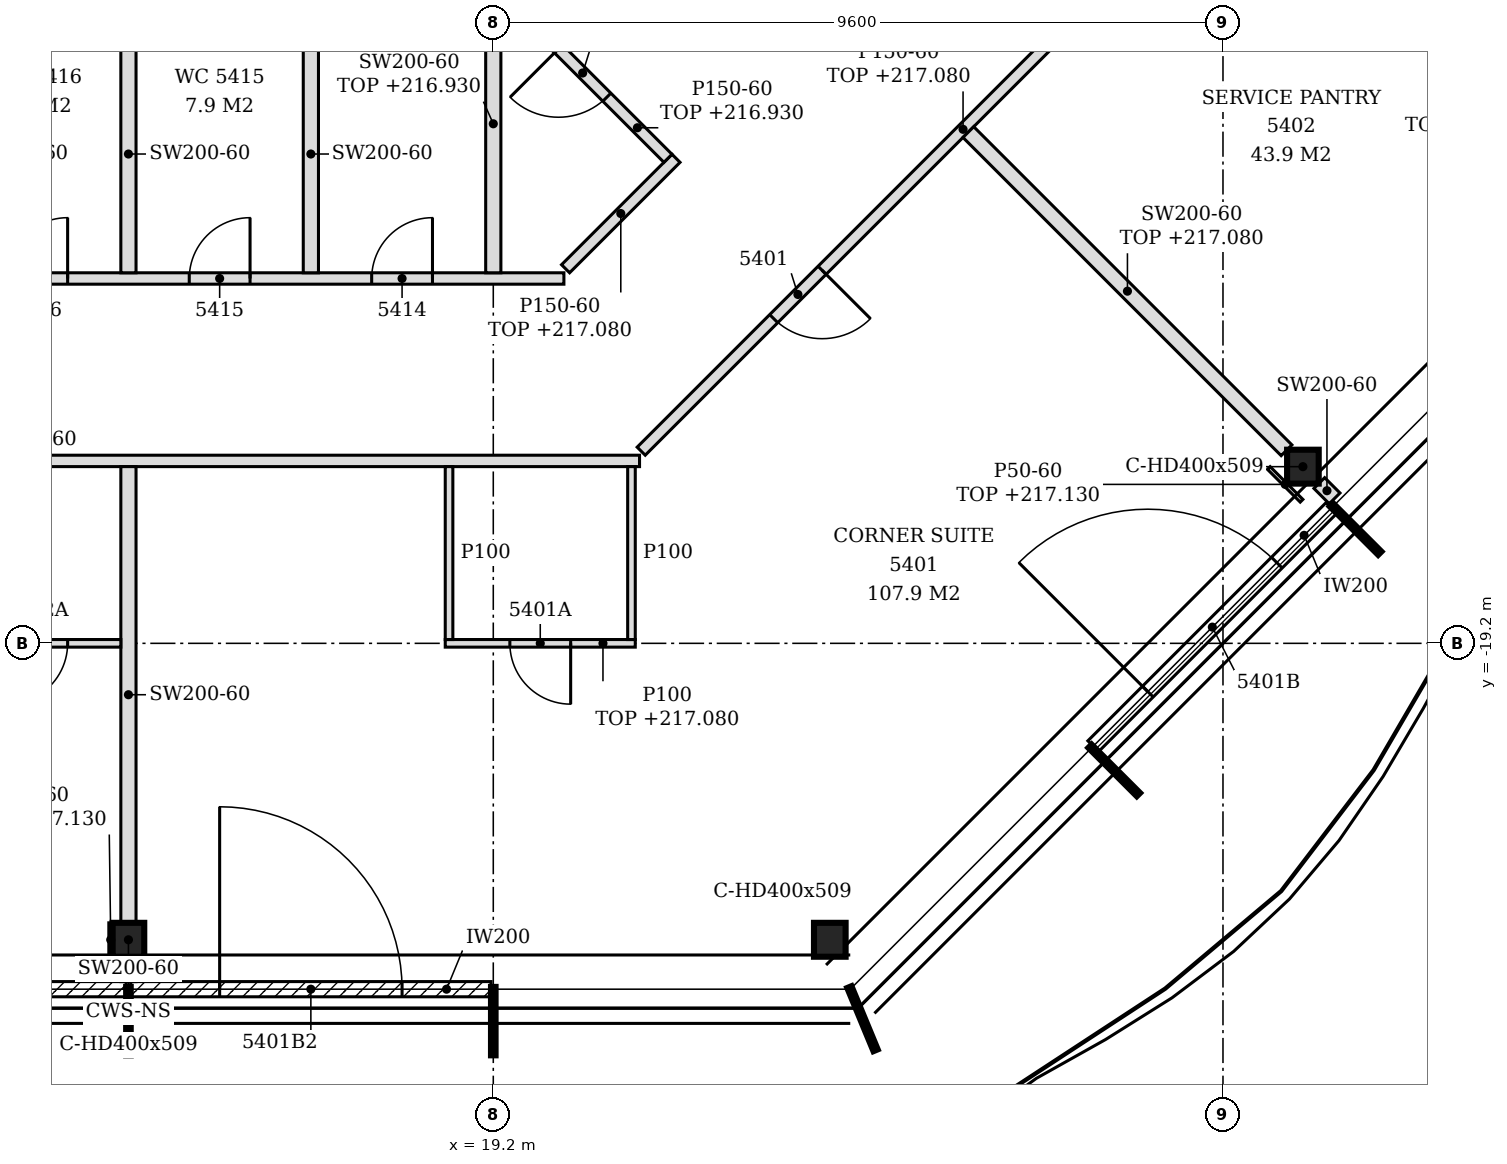
"""IFC4 building model, lengths in metres.
Left out: names, types, materials, properties, quantities, classifications, styles, units other than length and angle.
Written with IfcOpenShell. Run it as: python <this file> out.ifc"""

import sys

from ifc_helpers import new_model, si_unit, direction, frame, frame_2d, origin, origin_2d, place, context, subcontext, project, spatial, polyline, rectangle, i_section, outline, extrude, element, fill, save


model = new_model("IFC4")
c1 = context("Model", 3, precision=1e-05, world=origin(), true_north=direction((0.0, 1.0)))
c2 = subcontext(c1, "Body", "Model", "MODEL_VIEW")
j1 = project(units=[si_unit("LENGTHUNIT", "METRE"), si_unit("PLANEANGLEUNIT", "RADIAN")], contexts=[c1])
p1 = place(None, origin())
s1 = spatial("IfcSite", under=j1, at=p1, CompositionType="ELEMENT")
p2 = place(p1, origin())
s2 = spatial("IfcBuilding", under=s1, at=p2, CompositionType="ELEMENT")
p3 = place(p2, frame((0.0, 0.0, 214.2)))
s3 = spatial("IfcBuildingStorey", under=s2, at=p3, CompositionType="ELEMENT", Elevation=214.2)
for number, where, z_axis, x_axis in (
    (1, (14.4, -23.1, -0.15), (0.0, 0.0, 1.0), (1.0, 0.0, 0.0)),
    (2, (23.627, -23.1, -0.15), (0.0, 0.0, 1.0), (1.0, 0.0, 0.0)),
    (3, (29.852, -16.876, -0.15), (0.0, 0.0, 1.0), (1.0, 0.0, 0.0)),
):
    element("IfcColumn", number, at=place(p3, frame(where, z_axis=z_axis, x_axis=x_axis)), inside=s3, PredefinedType="COLUMN", context=c2, shape_type="SweptSolid", body=[
        extrude(i_section(OverallWidth=0.416, OverallDepth=0.446, WebThickness=0.039, FlangeThickness=0.063, FilletRadius=0.015, at=origin_2d()), origin(), (0.0, 0.0, 1.0), 3.6),
    ])
p4 = place(p3, frame((9.63, -23.75, 0.0), z_axis=(0.0, 0.0, 1.0), x_axis=(1.0, 0.0, 0.0)))
e4 = element("IfcWall", 4, at=p4, inside=s3, PredefinedType="NOTDEFINED", context=c2, shape_type="SweptSolid", body=[
    extrude(rectangle(XDim=4.74, YDim=0.2, at=frame_2d((2.37, 0.0))), origin(), (0.0, 0.0, 1.0), 3.45),
])
p5 = place(p4, frame((1.17, 0.0, 0.0)))
e5 = element("IfcOpeningElement", 5, at=p5, cuts=e4, PredefinedType="OPENING", context=c2, shape_type="SweptSolid", body=[
    extrude(rectangle(XDim=2.4, YDim=2.4, at=frame_2d((1.2, 1.2))), frame((0.0, 0.11, 0.0), z_axis=(0.0, -1.0, 0.0), x_axis=(1.0, 0.0, 0.0)), (0.0, 0.0, 1.0), 0.22),
])
p6 = place(p3, frame((14.43, -23.75, 0.0), z_axis=(0.0, 0.0, 1.0), x_axis=(1.0, 0.0, 0.0)))
e6 = element("IfcWall", 6, at=p6, inside=s3, PredefinedType="NOTDEFINED", context=c2, shape_type="SweptSolid", body=[
    extrude(rectangle(XDim=4.74, YDim=0.2, at=frame_2d((2.37, 0.0))), origin(), (0.0, 0.0, 1.0), 3.45),
])
p7 = place(p6, frame((1.17, 0.0, 0.0)))
e7 = element("IfcOpeningElement", 7, at=p7, cuts=e6, PredefinedType="OPENING", context=c2, shape_type="SweptSolid", body=[
    extrude(rectangle(XDim=2.4, YDim=2.4, at=frame_2d((1.2, 1.2))), frame((0.0, 0.11, 0.0), z_axis=(0.0, -1.0, 0.0), x_axis=(1.0, 0.0, 0.0)), (0.0, 0.0, 1.0), 0.22),
])
p8 = place(p3, frame((27.093, -20.553, 0.0), z_axis=(0.0, 0.0, 1.0), x_axis=(0.707079231393, 0.707134329907, 0.0)))
e8 = element("IfcWall", 8, at=p8, inside=s3, PredefinedType="NOTDEFINED", context=c2, shape_type="SweptSolid", body=[
    extrude(rectangle(XDim=4.431, YDim=0.2, at=frame_2d((2.215, 0.0))), origin(), (0.0, 0.0, 1.0), 3.45),
])
p9 = place(p8, frame((1.015, 0.0, 0.0)))
e9 = element("IfcOpeningElement", 9, at=p9, cuts=e8, PredefinedType="OPENING", context=c2, shape_type="SweptSolid", body=[
    extrude(rectangle(XDim=2.4, YDim=2.4, at=frame_2d((1.2, 1.2))), frame((0.0, 0.11, 0.0), z_axis=(0.0, -1.0, 0.0), x_axis=(1.0, 0.0, 0.0)), (0.0, 0.0, 1.0), 0.22),
])
p10 = place(p3, frame((14.4, -23.65, 0.0), z_axis=(0.0, 0.0, 1.0), x_axis=(0.0, 1.0, 0.0)))
e10 = element("IfcWall", 10, at=p10, inside=s3, PredefinedType="PARTITIONING", context=c2, shape_type="SweptSolid", body=[
    extrude(rectangle(XDim=0.327, YDim=0.2, at=frame_2d((0.164, 0.0))), origin(), (0.0, 0.0, 1.0), 3.45),
])
p11 = place(p3, frame((14.4, -22.877, 0.0), z_axis=(0.0, 0.0, 1.0), x_axis=(0.0, 1.0, 0.0)))
e11 = element("IfcWall", 11, at=p11, inside=s3, PredefinedType="PARTITIONING", context=c2, shape_type="SweptSolid", body=[
    extrude(outline(polyline([(0.0, 0.0), (6.002, 0.0), (6.002, 3.45), (3.782, 3.45), (3.78, 2.88), (3.572, 2.88), (3.57, 3.45), (0.0, 3.45), (0.0, 0.0)])), frame((0.0, 0.1, 0.0), z_axis=(0.0, -1.0, 0.0), x_axis=(1.0, 0.0, 0.0)), (0.0, 0.0, 1.0), 0.2),
])
p12 = place(p3, frame((11.95, -19.2, 0.0), z_axis=(0.0, 0.0, 1.0), x_axis=(1.0, 0.0, 0.0)))
e12 = element("IfcWall", 12, at=p12, inside=s3, PredefinedType="PARTITIONING", context=c2, shape_type="SweptSolid", body=[
    extrude(rectangle(XDim=2.35, YDim=0.1, at=frame_2d((1.175, 0.0))), origin(), (0.0, 0.0, 1.0), 2.88),
])
p13 = place(p12, frame((0.85, 0.0, 0.0)))
e13 = element("IfcOpeningElement", 13, at=p13, cuts=e12, PredefinedType="OPENING", context=c2, shape_type="SweptSolid", body=[
    extrude(rectangle(XDim=0.8, YDim=2.1, at=frame_2d((0.4, 1.05))), frame((0.0, 0.06, 0.0), z_axis=(0.0, -1.0, 0.0), x_axis=(1.0, 0.0, 0.0)), (0.0, 0.0, 1.0), 0.12),
])
p14 = place(p3, frame((18.568, -19.2, 0.0), z_axis=(0.0, 0.0, 1.0), x_axis=(1.0, 0.0, 0.0)))
e14 = element("IfcWall", 14, at=p14, inside=s3, PredefinedType="PARTITIONING", context=c2, shape_type="SweptSolid", body=[
    extrude(outline(polyline([(0.0, 0.0), (2.5, 0.0), (2.5, 2.88), (0.782, 2.88), (0.78, 2.73), (0.482, 2.73), (0.48, 2.88), (0.0, 2.88), (0.0, 0.0)])), frame((0.0, 0.05, 0.0), z_axis=(0.0, -1.0, 0.0), x_axis=(1.0, 0.0, 0.0)), (0.0, 0.0, 1.0), 0.1),
])
p15 = place(p14, frame((0.85, 0.0, 0.0)))
e15 = element("IfcOpeningElement", 15, at=p15, cuts=e14, PredefinedType="OPENING", context=c2, shape_type="SweptSolid", body=[
    extrude(rectangle(XDim=0.8, YDim=2.1, at=frame_2d((0.4, 1.05))), frame((0.0, 0.06, 0.0), z_axis=(0.0, -1.0, 0.0), x_axis=(1.0, 0.0, 0.0)), (0.0, 0.0, 1.0), 0.12),
])
p16 = place(p3, frame((18.618, -19.15, 0.0), z_axis=(0.0, 0.0, 1.0), x_axis=(0.0, 1.0, 0.0)))
e16 = element("IfcWall", 16, at=p16, inside=s3, PredefinedType="PARTITIONING", context=c2, shape_type="SweptSolid", body=[
    extrude(outline(polyline([(0.0, 0.0), (2.275, 0.0), (2.275, 3.45), (0.055, 3.45), (0.053, 2.88), (0.0, 2.88), (0.0, 0.0)])), frame((0.0, 0.05, 0.0), z_axis=(0.0, -1.0, 0.0), x_axis=(1.0, 0.0, 0.0)), (0.0, 0.0, 1.0), 0.1),
])
p17 = place(p3, frame((21.018, -19.15, 0.0), z_axis=(0.0, 0.0, 1.0), x_axis=(0.0, 1.0, 0.0)))
e17 = element("IfcWall", 17, at=p17, inside=s3, PredefinedType="PARTITIONING", context=c2, shape_type="SweptSolid", body=[
    extrude(outline(polyline([(0.0, 0.0), (2.275, 0.0), (2.275, 3.45), (0.045, 3.45), (0.043, 2.98), (0.0, 2.98), (0.0, 0.0)])), frame((0.0, 0.05, 0.0), z_axis=(0.0, -1.0, 0.0), x_axis=(1.0, 0.0, 0.0)), (0.0, 0.0, 1.0), 0.1),
])
p18 = place(p3, frame((30.269, -17.293, 0.0), z_axis=(0.0, 0.0, 1.0), x_axis=(-0.707106781187, 0.707106781187, 0.0)))
e18 = element("IfcWall", 18, at=p18, inside=s3, PredefinedType="PARTITIONING", context=c2, shape_type="SweptSolid", body=[
    extrude(rectangle(XDim=0.285, YDim=0.2, at=frame_2d((0.143, 0.0))), origin(), (0.0, 0.0, 1.0), 3.45),
])
p19 = place(p3, frame((-0.844, -16.8, 0.0), z_axis=(0.0, 0.0, 1.0), x_axis=(1.0, 0.0, 0.0)))
e19 = element("IfcWall", 19, at=p19, inside=s3, PredefinedType="PARTITIONING", context=c2, shape_type="SweptSolid", body=[
    extrude(outline(polyline([(0.0, 0.0), (21.968, 0.0), (21.968, 3.45), (20.194, 3.45), (20.191, 2.73), (19.894, 2.73), (19.892, 3.45), (8.194, 3.45), (8.191, 2.73), (7.894, 2.73), (7.892, 3.45), (0.0, 3.45), (0.0, 0.0)])), frame((0.0, 0.075, 0.0), z_axis=(0.0, -1.0, 0.0), x_axis=(1.0, 0.0, 0.0)), (0.0, 0.0, 1.0), 0.15),
])
p20 = place(p19, frame((5.194, 0.0, 0.0)))
e20 = element("IfcOpeningElement", 20, at=p20, cuts=e19, PredefinedType="OPENING", context=c2, shape_type="SweptSolid", body=[
    extrude(rectangle(XDim=0.9, YDim=2.1, at=frame_2d((0.45, 1.05))), frame((0.0, 0.085, 0.0), z_axis=(0.0, -1.0, 0.0), x_axis=(1.0, 0.0, 0.0)), (0.0, 0.0, 1.0), 0.17),
])
p21 = place(p3, frame((21.146, -16.672, 0.0), z_axis=(0.0, 0.0, 1.0), x_axis=(0.707100999376, 0.70711256295, 0.0)))
e21 = element("IfcWall", 21, at=p21, inside=s3, PredefinedType="PARTITIONING", context=c2, shape_type="SweptSolid", body=[
    extrude(rectangle(XDim=21.113, YDim=0.15, at=frame_2d((10.556, 0.0))), origin(), (0.0, 0.0, 1.0), 2.88),
])
p22 = place(p21, frame((2.466, 0.0, 0.0)))
e22 = element("IfcOpeningElement", 22, at=p22, cuts=e21, PredefinedType="OPENING", context=c2, shape_type="SweptSolid", body=[
    extrude(rectangle(XDim=0.9, YDim=2.1, at=frame_2d((0.45, 1.05))), frame((0.0, 0.085, 0.0), z_axis=(0.0, -1.0, 0.0), x_axis=(1.0, 0.0, 0.0)), (0.0, 0.0, 1.0), 0.17),
])
p23 = place(p21, frame((8.611, 0.0, 0.0)))
e23 = element("IfcOpeningElement", 23, at=p23, cuts=e21, PredefinedType="OPENING", context=c2, shape_type="SweptSolid", body=[
    extrude(rectangle(XDim=0.9, YDim=2.1, at=frame_2d((0.45, 1.05))), frame((0.0, 0.085, 0.0), z_axis=(0.0, -1.0, 0.0), x_axis=(1.0, 0.0, 0.0)), (0.0, 0.0, 1.0), 0.17),
])
p24 = place(p21, frame((13.012, 0.0, 0.0)))
e24 = element("IfcOpeningElement", 24, at=p24, cuts=e21, PredefinedType="OPENING", context=c2, shape_type="SweptSolid", body=[
    extrude(rectangle(XDim=0.9, YDim=2.1, at=frame_2d((0.45, 1.05))), frame((0.0, 0.085, 0.0), z_axis=(0.0, -1.0, 0.0), x_axis=(1.0, 0.0, 0.0)), (0.0, 0.0, 1.0), 0.17),
])
p25 = place(p21, frame((16.261, 0.0, 0.0)))
e25 = element("IfcOpeningElement", 25, at=p25, cuts=e21, PredefinedType="OPENING", context=c2, shape_type="SweptSolid", body=[
    extrude(rectangle(XDim=0.9, YDim=2.1, at=frame_2d((0.45, 1.05))), frame((0.0, 0.085, 0.0), z_axis=(0.0, -1.0, 0.0), x_axis=(1.0, 0.0, 0.0)), (0.0, 0.0, 1.0), 0.17),
])
p26 = place(p3, frame((29.636, -16.66, 0.0), z_axis=(0.0, 0.0, 1.0), x_axis=(-0.707106781187, 0.707106781187, 0.0)))
e26 = element("IfcWall", 26, at=p26, inside=s3, PredefinedType="PARTITIONING", context=c2, shape_type="SweptSolid", body=[
    extrude(rectangle(XDim=5.92, YDim=0.2, at=frame_2d((2.96, 0.0))), origin(), (0.0, 0.0, 1.0), 2.88),
])
p27 = place(p3, frame((2.325, -14.4, 0.0), z_axis=(0.0, 0.0, 1.0), x_axis=(1.0, 0.0, 0.0)))
e27 = element("IfcWall", 27, at=p27, inside=s3, PredefinedType="PARTITIONING", context=c2, shape_type="SweptSolid", body=[
    extrude(outline(polyline([(0.0, 0.0), (17.804, 0.0), (17.804, 2.88), (17.025, 2.88), (17.023, 2.73), (16.725, 2.73), (16.723, 2.88), (5.025, 2.88), (5.023, 2.73), (4.725, 2.73), (4.723, 2.88), (0.0, 2.88), (0.0, 0.0)])), frame((0.0, 0.075, 0.0), z_axis=(0.0, -1.0, 0.0), x_axis=(1.0, 0.0, 0.0)), (0.0, 0.0, 1.0), 0.15),
])
p28 = place(p27, frame((15.275, 0.0, 0.0)))
e28 = element("IfcOpeningElement", 28, at=p28, cuts=e27, PredefinedType="OPENING", context=c2, shape_type="SweptSolid", body=[
    extrude(rectangle(XDim=0.8, YDim=2.1, at=frame_2d((0.4, 1.05))), frame((0.0, 0.085, 0.0), z_axis=(0.0, -1.0, 0.0), x_axis=(1.0, 0.0, 0.0)), (0.0, 0.0, 1.0), 0.17),
])
p29 = place(p27, frame((12.875, 0.0, 0.0)))
e29 = element("IfcOpeningElement", 29, at=p29, cuts=e27, PredefinedType="OPENING", context=c2, shape_type="SweptSolid", body=[
    extrude(rectangle(XDim=0.8, YDim=2.1, at=frame_2d((0.4, 1.05))), frame((0.0, 0.085, 0.0), z_axis=(0.0, -1.0, 0.0), x_axis=(1.0, 0.0, 0.0)), (0.0, 0.0, 1.0), 0.17),
])
p30 = place(p27, frame((10.475, 0.0, 0.0)))
e30 = element("IfcOpeningElement", 30, at=p30, cuts=e27, PredefinedType="OPENING", context=c2, shape_type="SweptSolid", body=[
    extrude(rectangle(XDim=0.8, YDim=2.1, at=frame_2d((0.4, 1.05))), frame((0.0, 0.085, 0.0), z_axis=(0.0, -1.0, 0.0), x_axis=(1.0, 0.0, 0.0)), (0.0, 0.0, 1.0), 0.17),
])
for number, where, z_axis, x_axis in (
    (31, (14.4, -14.325, 0.0), (0.0, 0.0, 1.0), (0.0, 1.0, 0.0)),
    (32, (16.8, -14.325, 0.0), (0.0, 0.0, 1.0), (0.0, 1.0, 0.0)),
):
    element("IfcWall", number, at=place(p3, frame(where, z_axis=z_axis, x_axis=x_axis)), inside=s3, PredefinedType="PARTITIONING", context=c2, shape_type="SweptSolid", body=[
        extrude(outline(polyline([(0.0, 0.0), (3.125, 0.0), (3.125, 3.45), (0.03, 3.45), (0.028, 2.88), (0.0, 2.88), (0.0, 0.0)])), frame((0.0, 0.1, 0.0), z_axis=(0.0, -1.0, 0.0), x_axis=(1.0, 0.0, 0.0)), (0.0, 0.0, 1.0), 0.2),
    ])
p31 = place(p3, frame((19.2, -14.325, 0.0), z_axis=(0.0, 0.0, 1.0), x_axis=(0.0, 1.0, 0.0)))
e33 = element("IfcWall", 33, at=p31, inside=s3, PredefinedType="PARTITIONING", context=c2, shape_type="SweptSolid", body=[
    extrude(rectangle(XDim=3.92, YDim=0.2, at=frame_2d((1.96, 0.0))), origin(), (0.0, 0.0, 1.0), 2.73),
])
p32 = place(p3, frame((20.151, -14.272, 0.0), z_axis=(0.0, 0.0, 1.0), x_axis=(0.707106781187, 0.707106781187, 0.0)))
e34 = element("IfcWall", 34, at=p32, inside=s3, PredefinedType="PARTITIONING", context=c2, shape_type="SweptSolid", body=[
    extrude(rectangle(XDim=2.055, YDim=0.15, at=frame_2d((1.027, 0.0))), origin(), (0.0, 0.0, 1.0), 2.88),
])
p33 = place(p3, frame((34.581, -12.981, 0.0), z_axis=(0.0, 0.0, 1.0), x_axis=(-0.707133900936, 0.707079660397, 0.0)))
e35 = element("IfcWall", 35, at=p33, inside=s3, PredefinedType="PARTITIONING", context=c2, shape_type="SweptSolid", body=[
    extrude(rectangle(XDim=4.501, YDim=0.2, at=frame_2d((2.25, 0.0))), origin(), (0.0, 0.0, 1.0), 2.63),
])
p34 = place(p3, frame((21.498, -12.819, 0.0), z_axis=(0.0, 0.0, 1.0), x_axis=(-0.707106781187, 0.707106781187, 0.0)))
e36 = element("IfcWall", 36, at=p34, inside=s3, PredefinedType="PARTITIONING", context=c2, shape_type="SweptSolid", body=[
    extrude(rectangle(XDim=3.033, YDim=0.15, at=frame_2d((1.517, 0.0))), origin(), (0.0, 0.0, 1.0), 2.73),
])
p35 = place(p34, frame((1.137, 0.0, 0.0)))
e37 = element("IfcOpeningElement", 37, at=p35, cuts=e36, PredefinedType="OPENING", context=c2, shape_type="SweptSolid", body=[
    extrude(rectangle(XDim=0.9, YDim=2.1, at=frame_2d((0.45, 1.05))), frame((0.0, 0.085, 0.0), z_axis=(0.0, -1.0, 0.0), x_axis=(1.0, 0.0, 0.0)), (0.0, 0.0, 1.0), 0.17),
])
p36 = place(p3, frame((14.167, -23.323, 0.0), z_axis=(0.0, 0.0, 1.0), x_axis=(0.0, 1.0, 0.0)))
e38 = element("IfcWall", 38, at=p36, inside=s3, PredefinedType="PARTITIONING", context=c2, shape_type="SweptSolid", body=[
    extrude(rectangle(XDim=0.446, YDim=0.05, at=frame_2d((0.223, 0.0))), origin(), (0.0, 0.0, 1.0), 2.93),
])
p37 = place(p3, frame((29.834, -17.324, 0.0), z_axis=(0.0, 0.0, 1.0), x_axis=(-0.706906496032, 0.707307009627, 0.0)))
e39 = element("IfcWall", 39, at=p37, inside=s3, PredefinedType="PARTITIONING", context=c2, shape_type="SweptSolid", body=[
    extrude(rectangle(XDim=0.61, YDim=0.05, at=frame_2d((0.305, 0.0))), origin(), (0.0, 0.0, 1.0), 2.93),
])
p38 = place(p7, origin())
e40 = element("IfcDoor", 40, at=p38, inside=s3, OperationType="SINGLE_SWING_LEFT", PredefinedType="DOOR", context=c2, shape_type="SweptSolid", body=[
    extrude(rectangle(XDim=2.4, YDim=2.4, at=frame_2d((1.2, 1.2))), frame((0.0, 0.025, 0.0), z_axis=(0.0, -1.0, 0.0), x_axis=(1.0, 0.0, 0.0)), (0.0, 0.0, 1.0), 0.05),
])
fill(e7, e40)
p39 = place(p9, origin())
e41 = element("IfcDoor", 41, at=p39, inside=s3, OperationType="SINGLE_SWING_LEFT", PredefinedType="DOOR", context=c2, shape_type="SweptSolid", body=[
    extrude(rectangle(XDim=2.4, YDim=2.4, at=frame_2d((1.2, 1.2))), frame((0.0, 0.025, 0.0), z_axis=(0.0, -1.0, 0.0), x_axis=(1.0, 0.0, 0.0)), (0.0, 0.0, 1.0), 0.05),
])
fill(e9, e41)
p40 = place(p22, frame((0.9, 0.0, 0.0), z_axis=(0.0, 0.0, 1.0), x_axis=(-1.0, 0.0, 0.0)))
e42 = element("IfcDoor", 42, at=p40, inside=s3, OperationType="SINGLE_SWING_LEFT", PredefinedType="DOOR", context=c2, shape_type="SweptSolid", body=[
    extrude(rectangle(XDim=0.9, YDim=2.1, at=frame_2d((0.45, 1.05))), frame((0.0, 0.025, 0.0), z_axis=(0.0, -1.0, 0.0), x_axis=(1.0, 0.0, 0.0)), (0.0, 0.0, 1.0), 0.05),
])
fill(e22, e42)
p41 = place(p15, frame((0.8, 0.0, 0.0), z_axis=(0.0, 0.0, 1.0), x_axis=(-1.0, 0.0, 0.0)))
e43 = element("IfcDoor", 43, at=p41, inside=s3, OperationType="SINGLE_SWING_LEFT", PredefinedType="DOOR", context=c2, shape_type="SweptSolid", body=[
    extrude(rectangle(XDim=0.8, YDim=2.1, at=frame_2d((0.4, 1.05))), frame((0.0, 0.025, 0.0), z_axis=(0.0, -1.0, 0.0), x_axis=(1.0, 0.0, 0.0)), (0.0, 0.0, 1.0), 0.05),
])
fill(e15, e43)
p42 = place(p13, frame((0.8, 0.0, 0.0), z_axis=(0.0, 0.0, 1.0), x_axis=(-1.0, 0.0, 0.0)))
e44 = element("IfcDoor", 44, at=p42, inside=s3, OperationType="SINGLE_SWING_RIGHT", PredefinedType="DOOR", context=c2, shape_type="SweptSolid", body=[
    extrude(rectangle(XDim=0.8, YDim=2.1, at=frame_2d((0.4, 1.05))), frame((0.0, 0.025, 0.0), z_axis=(0.0, -1.0, 0.0), x_axis=(1.0, 0.0, 0.0)), (0.0, 0.0, 1.0), 0.05),
])
fill(e13, e44)
p43 = place(p28, origin())
e45 = element("IfcDoor", 45, at=p43, inside=s3, OperationType="SINGLE_SWING_RIGHT", PredefinedType="DOOR", context=c2, shape_type="SweptSolid", body=[
    extrude(rectangle(XDim=0.8, YDim=2.1, at=frame_2d((0.4, 1.05))), frame((0.0, 0.025, 0.0), z_axis=(0.0, -1.0, 0.0), x_axis=(1.0, 0.0, 0.0)), (0.0, 0.0, 1.0), 0.05),
])
fill(e28, e45)
p44 = place(p29, origin())
e46 = element("IfcDoor", 46, at=p44, inside=s3, OperationType="SINGLE_SWING_RIGHT", PredefinedType="DOOR", context=c2, shape_type="SweptSolid", body=[
    extrude(rectangle(XDim=0.8, YDim=2.1, at=frame_2d((0.4, 1.05))), frame((0.0, 0.025, 0.0), z_axis=(0.0, -1.0, 0.0), x_axis=(1.0, 0.0, 0.0)), (0.0, 0.0, 1.0), 0.05),
])
fill(e29, e46)
p45 = place(p30, origin())
e47 = element("IfcDoor", 47, at=p45, inside=s3, OperationType="SINGLE_SWING_RIGHT", PredefinedType="DOOR", context=c2, shape_type="SweptSolid", body=[
    extrude(rectangle(XDim=0.8, YDim=2.1, at=frame_2d((0.4, 1.05))), frame((0.0, 0.025, 0.0), z_axis=(0.0, -1.0, 0.0), x_axis=(1.0, 0.0, 0.0)), (0.0, 0.0, 1.0), 0.05),
])
fill(e30, e47)
p46 = place(p35, origin())
e48 = element("IfcDoor", 48, at=p46, inside=s3, OperationType="SINGLE_SWING_RIGHT", PredefinedType="DOOR", context=c2, shape_type="SweptSolid", body=[
    extrude(rectangle(XDim=0.9, YDim=2.1, at=frame_2d((0.45, 1.05))), frame((0.0, 0.025, 0.0), z_axis=(0.0, -1.0, 0.0), x_axis=(1.0, 0.0, 0.0)), (0.0, 0.0, 1.0), 0.05),
])
fill(e37, e48)
save(model, sys.argv[1])
